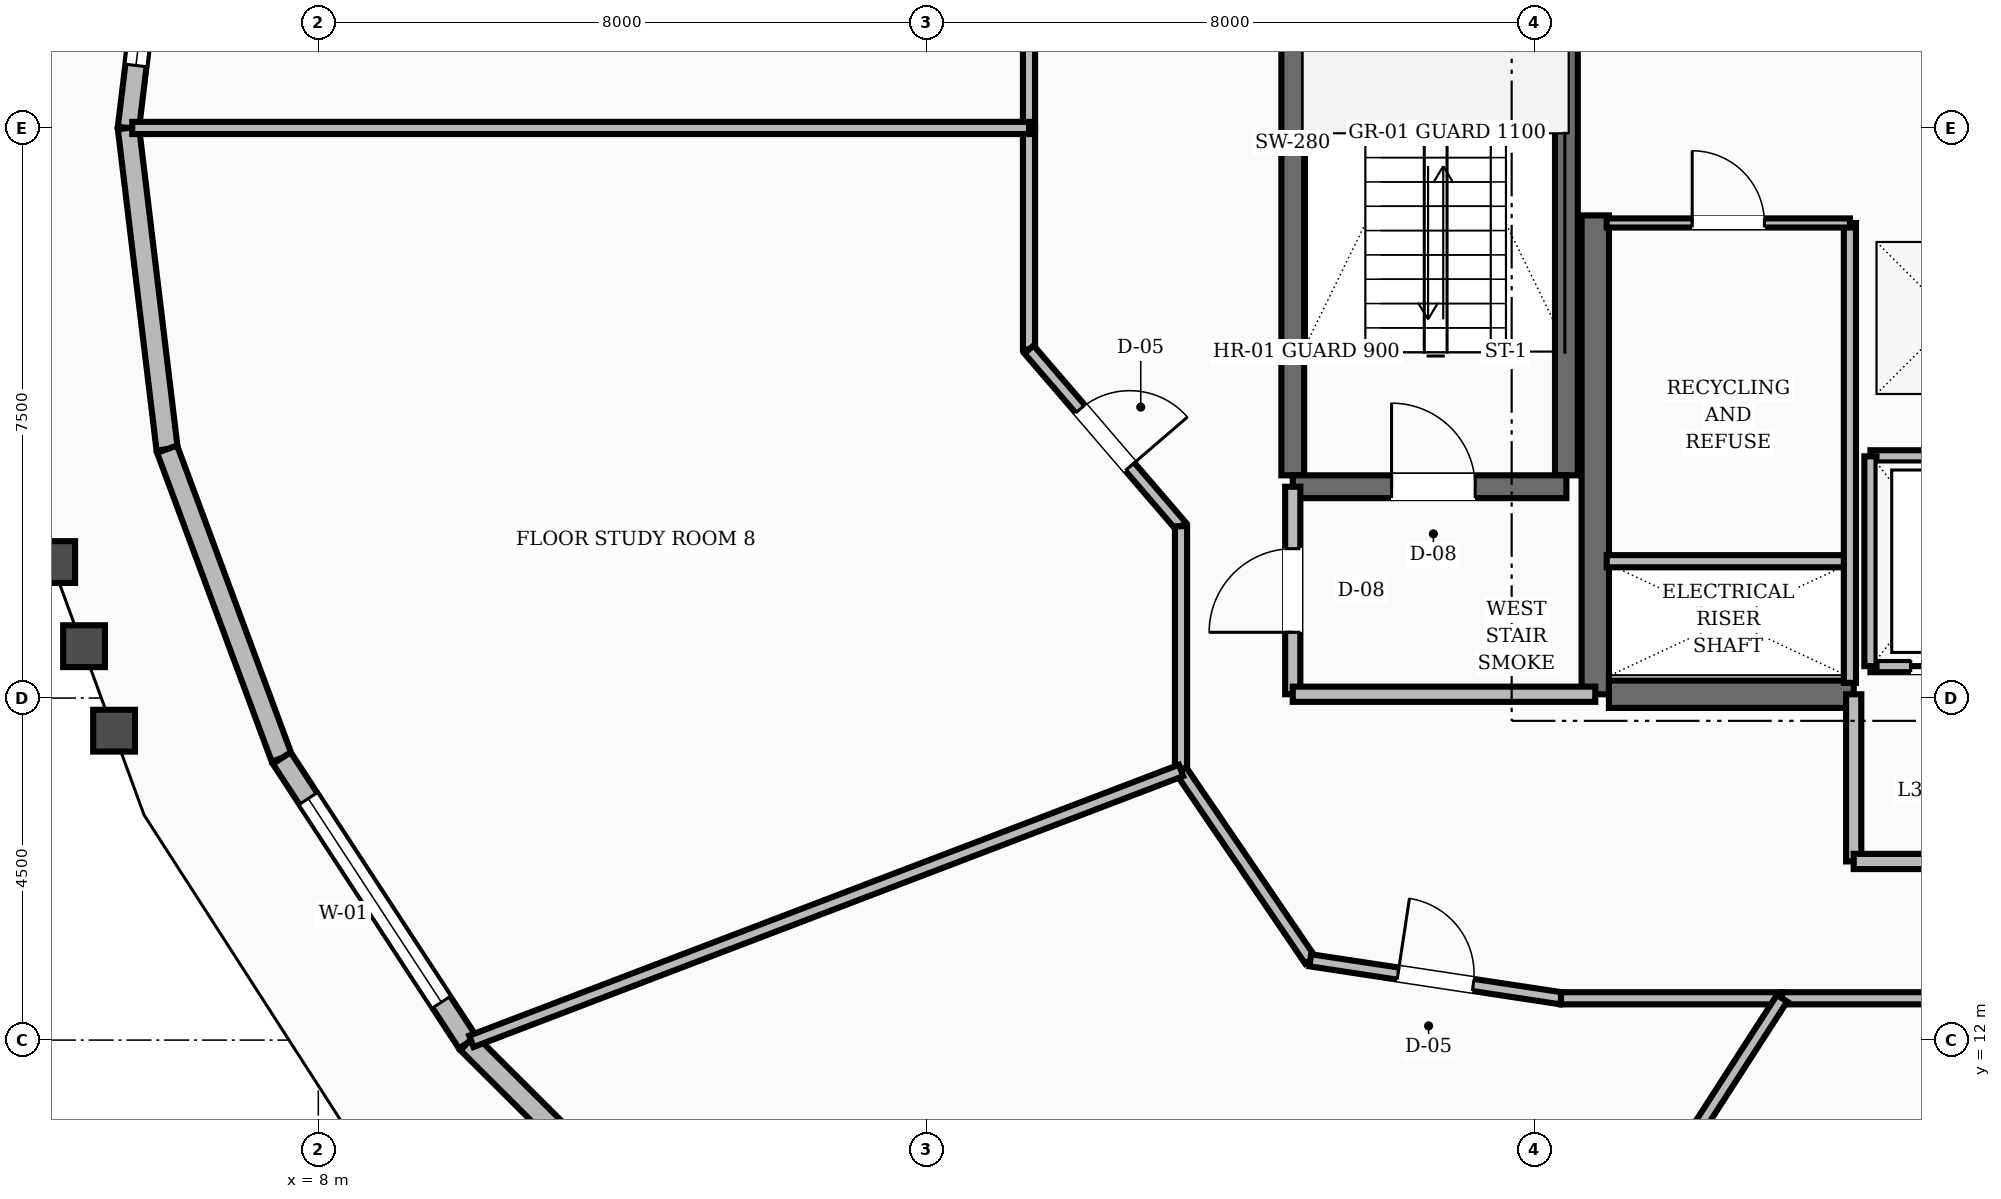
"""IFC4 building model, lengths in metres.
Left out: names, types, materials, properties, quantities, classifications, styles, units other than length and angle.
Written with IfcOpenShell. Run it as: python <this file> out.ifc"""

import sys

from ifc_helpers import new_model, si_unit, direction, frame, frame_2d, origin, place, context, subcontext, project, spatial, rectangle, extrude, element, fill, save


model = new_model("IFC4")
c1 = context("Model", 3, precision=1e-05, world=origin(), true_north=direction((0.0, 1.0)))
c2 = subcontext(c1, "Body", "Model", "MODEL_VIEW")
j1 = project(units=[si_unit("LENGTHUNIT", "METRE"), si_unit("PLANEANGLEUNIT", "RADIAN")], contexts=[c1])
p1 = place(None, origin())
s1 = spatial("IfcSite", under=j1, at=p1, CompositionType="ELEMENT")
p2 = place(p1, origin())
s2 = spatial("IfcBuilding", under=s1, at=p2, CompositionType="ELEMENT")
p3 = place(p2, frame((0.0, 0.0, 138.8)))
s3 = spatial("IfcBuildingStorey", under=s2, at=p3, CompositionType="ELEMENT", Elevation=138.8)
p4 = place(p3, frame((24.8, 16.55, 0.0), z_axis=(0.0, 0.0, 1.0), x_axis=(0.0, 1.0, 0.0)))
e1 = element("IfcWall", 1, at=p4, inside=s3, PredefinedType="SHEAR", context=c2, shape_type="SweptSolid", body=[
    extrude(rectangle(XDim=6.3, YDim=0.36, at=frame_2d((3.15, 0.0))), origin(), (0.0, 0.0, 1.0), 3.6),
])
p5 = place(p3, frame((24.98, 16.55, 0.0), z_axis=(0.0, 0.0, 1.0), x_axis=(1.0, 0.0, 0.0)))
e2 = element("IfcWall", 2, at=p5, inside=s3, PredefinedType="SHEAR", context=c2, shape_type="SweptSolid", body=[
    extrude(rectangle(XDim=3.22, YDim=0.36, at=frame_2d((1.61, 0.0))), origin(), (0.0, 0.0, 1.0), 3.6),
])
for number, where, z_axis, x_axis in (
    (3, (20.82, 19.43, 0.0), (0.0, 0.0, 1.0), (0.0, 1.0, 0.0)),
    (4, (24.42, 19.43, 0.0), (0.0, 0.0, 1.0), (0.0, 1.0, 0.0)),
):
    element("IfcWall", number, at=place(p3, frame(where, z_axis=z_axis, x_axis=x_axis)), inside=s3, PredefinedType="SHEAR", context=c2, shape_type="SweptSolid", body=[
        extrude(rectangle(XDim=8.74, YDim=0.3, at=frame_2d((4.37, 0.0))), origin(), (0.0, 0.0, 1.0), 3.6),
    ])
p6 = place(p3, frame((20.82, 19.28, 0.0), z_axis=(0.0, 0.0, 1.0), x_axis=(1.0, 0.0, 0.0)))
e5 = element("IfcWall", 5, at=p6, inside=s3, PredefinedType="SHEAR", context=c2, shape_type="SweptSolid", body=[
    extrude(rectangle(XDim=3.6, YDim=0.3, at=frame_2d((1.8, 0.0))), origin(), (0.0, 0.0, 1.0), 3.6),
])
p7 = place(p6, frame((1.3, 0.0, 0.0)))
e6 = element("IfcOpeningElement", 6, at=p7, cuts=e5, PredefinedType="OPENING", context=c2, shape_type="SweptSolid", body=[
    extrude(rectangle(XDim=1.1, YDim=2.1, at=frame_2d((0.55, 1.05))), frame((0.0, 0.16, 0.0), z_axis=(0.0, -1.0, 0.0), x_axis=(1.0, 0.0, 0.0)), (0.0, 0.0, 1.0), 0.32),
])
p8 = place(p3, frame((6.011, 28.226, 0.0), z_axis=(0.0, 0.0, 1.0), x_axis=(-0.119649579006, -0.992816185527, 0.0)))
e7 = element("IfcWall", 7, at=p8, inside=s3, PredefinedType="STANDARD", context=c2, shape_type="SweptSolid", body=[
    extrude(rectangle(XDim=4.256, YDim=0.28, at=frame_2d((2.128, 0.0))), origin(), (0.0, 0.0, 1.0), 2.82),
])
p9 = place(p8, frame((0.828, 0.0, 0.8)))
e8 = element("IfcOpeningElement", 8, at=p9, cuts=e7, PredefinedType="OPENING", context=c2, shape_type="SweptSolid", body=[
    extrude(rectangle(XDim=2.6, YDim=1.65, at=frame_2d((1.3, 0.825))), frame((0.0, 0.15, 0.0), z_axis=(0.0, -1.0, 0.0), x_axis=(1.0, 0.0, 0.0)), (0.0, 0.0, 1.0), 0.3),
])
p10 = place(p3, frame((5.502, 24.0, 0.0), z_axis=(0.0, 0.0, 1.0), x_axis=(0.119649579006, -0.992816185527, 0.0)))
e9 = element("IfcWall", 9, at=p10, inside=s3, PredefinedType="STANDARD", context=c2, shape_type="SweptSolid", body=[
    extrude(rectangle(XDim=4.256, YDim=0.28, at=frame_2d((2.128, 0.0))), origin(), (0.0, 0.0, 1.0), 2.82),
])
p11 = place(p3, frame((6.011, 19.774, 0.0), z_axis=(0.0, 0.0, 1.0), x_axis=(0.347886684165, -0.937536588609, 0.0)))
e10 = element("IfcWall", 10, at=p11, inside=s3, PredefinedType="STANDARD", context=c2, shape_type="SweptSolid", body=[
    extrude(rectangle(XDim=4.334, YDim=0.28, at=frame_2d((2.167, 0.0))), origin(), (0.0, 0.0, 1.0), 2.82),
])
p12 = place(p3, frame((7.519, 15.711, 0.0), z_axis=(0.0, 0.0, 1.0), x_axis=(0.54727435463, -0.836953272749, 0.0)))
e11 = element("IfcWall", 11, at=p12, inside=s3, PredefinedType="STANDARD", context=c2, shape_type="SweptSolid", body=[
    extrude(rectangle(XDim=4.474, YDim=0.28, at=frame_2d((2.237, 0.0))), origin(), (0.0, 0.0, 1.0), 2.82),
])
p13 = place(p12, frame((0.637, 0.0, 0.8)))
e12 = element("IfcOpeningElement", 12, at=p13, cuts=e11, PredefinedType="OPENING", context=c2, shape_type="SweptSolid", body=[
    extrude(rectangle(XDim=3.2, YDim=1.65, at=frame_2d((1.6, 0.825))), frame((0.0, 0.15, 0.0), z_axis=(0.0, -1.0, 0.0), x_axis=(1.0, 0.0, 0.0)), (0.0, 0.0, 1.0), 0.3),
])
p14 = place(p3, frame((9.968, 11.966, 0.0), z_axis=(0.0, 0.0, 1.0), x_axis=(0.708522616078, -0.705688105686, 0.0)))
e13 = element("IfcWall", 13, at=p14, inside=s3, PredefinedType="STANDARD", context=c2, shape_type="SweptSolid", body=[
    extrude(rectangle(XDim=4.651, YDim=0.28, at=frame_2d((2.326, 0.0))), origin(), (0.0, 0.0, 1.0), 2.82),
])
p15 = place(p3, frame((20.82, 16.55, 0.0), z_axis=(0.0, 0.0, 1.0), x_axis=(0.0, 1.0, 0.0)))
e14 = element("IfcWall", 14, at=p15, inside=s3, PredefinedType="SOLIDWALL", context=c2, shape_type="SweptSolid", body=[
    extrude(rectangle(XDim=2.73, YDim=0.2, at=frame_2d((1.365, 0.0))), origin(), (0.0, 0.0, 1.0), 2.8),
])
p16 = place(p15, frame((0.815, 0.0, 0.0)))
e15 = element("IfcOpeningElement", 15, at=p16, cuts=e14, PredefinedType="OPENING", context=c2, shape_type="SweptSolid", body=[
    extrude(rectangle(XDim=1.1, YDim=2.1, at=frame_2d((0.55, 1.05))), frame((0.0, 0.11, 0.0), z_axis=(0.0, -1.0, 0.0), x_axis=(1.0, 0.0, 0.0)), (0.0, 0.0, 1.0), 0.22),
])
p17 = place(p3, frame((20.82, 16.55, 0.0), z_axis=(0.0, 0.0, 1.0), x_axis=(1.0, 0.0, 0.0)))
e16 = element("IfcWall", 16, at=p17, inside=s3, PredefinedType="SOLIDWALL", context=c2, shape_type="SweptSolid", body=[
    extrude(rectangle(XDim=3.98, YDim=0.2, at=frame_2d((1.99, 0.0))), origin(), (0.0, 0.0, 1.0), 2.8),
])
p18 = place(p3, frame((28.2, 14.35, 0.0), z_axis=(0.0, 0.0, 1.0), x_axis=(0.0, 1.0, 0.0)))
e17 = element("IfcWall", 17, at=p18, inside=s3, PredefinedType="SOLIDWALL", context=c2, shape_type="SweptSolid", body=[
    extrude(rectangle(XDim=2.2, YDim=0.2, at=frame_2d((1.1, 0.0))), origin(), (0.0, 0.0, 1.0), 2.8),
])
p19 = place(p3, frame((28.2, 14.35, 0.0), z_axis=(0.0, 0.0, 1.0), x_axis=(1.0, 0.0, 0.0)))
e18 = element("IfcWall", 18, at=p19, inside=s3, PredefinedType="SOLIDWALL", context=c2, shape_type="SweptSolid", body=[
    extrude(rectangle(XDim=7.6, YDim=0.2, at=frame_2d((3.8, 0.0))), origin(), (0.0, 0.0, 1.0), 2.8),
])
p20 = place(p19, frame((3.2, 0.0, 0.0)))
e19 = element("IfcOpeningElement", 19, at=p20, cuts=e18, PredefinedType="OPENING", context=c2, shape_type="SweptSolid", body=[
    extrude(rectangle(XDim=1.2, YDim=2.1, at=frame_2d((0.6, 1.05))), frame((0.0, 0.11, 0.0), z_axis=(0.0, -1.0, 0.0), x_axis=(1.0, 0.0, 0.0)), (0.0, 0.0, 1.0), 0.22),
])
p21 = place(p3, frame((28.42, 16.92, 0.0), z_axis=(0.0, 0.0, 1.0), x_axis=(1.0, 0.0, 0.0)))
e20 = element("IfcWall", 20, at=p21, inside=s3, PredefinedType="SOLIDWALL", context=c2, shape_type="SweptSolid", body=[
    extrude(rectangle(XDim=7.16, YDim=0.16, at=frame_2d((3.58, 0.0))), origin(), (0.0, 0.0, 1.0), 2.8),
])
p22 = place(p21, frame((0.53, 0.0, 0.0)))
e21 = element("IfcOpeningElement", 21, at=p22, cuts=e20, PredefinedType="OPENING", context=c2, shape_type="SweptSolid", body=[
    extrude(rectangle(XDim=1.1, YDim=2.15, at=frame_2d((0.55, 1.075))), frame((0.0, 0.09, 0.0), z_axis=(0.0, -1.0, 0.0), x_axis=(1.0, 0.0, 0.0)), (0.0, 0.0, 1.0), 0.18),
])
p23 = place(p21, frame((3.03, 0.0, 0.0)))
e22 = element("IfcOpeningElement", 22, at=p23, cuts=e20, PredefinedType="OPENING", context=c2, shape_type="SweptSolid", body=[
    extrude(rectangle(XDim=1.1, YDim=2.15, at=frame_2d((0.55, 1.075))), frame((0.0, 0.09, 0.0), z_axis=(0.0, -1.0, 0.0), x_axis=(1.0, 0.0, 0.0)), (0.0, 0.0, 1.0), 0.18),
])
p24 = place(p21, frame((5.53, 0.0, 0.0)))
e23 = element("IfcOpeningElement", 23, at=p24, cuts=e20, PredefinedType="OPENING", context=c2, shape_type="SweptSolid", body=[
    extrude(rectangle(XDim=1.1, YDim=2.15, at=frame_2d((0.55, 1.075))), frame((0.0, 0.09, 0.0), z_axis=(0.0, -1.0, 0.0), x_axis=(1.0, 0.0, 0.0)), (0.0, 0.0, 1.0), 0.18),
])
p25 = place(p3, frame((28.42, 19.68, 0.0), z_axis=(0.0, 0.0, 1.0), x_axis=(1.0, 0.0, 0.0)))
e24 = element("IfcWall", 24, at=p25, inside=s3, PredefinedType="SOLIDWALL", context=c2, shape_type="SweptSolid", body=[
    extrude(rectangle(XDim=7.16, YDim=0.16, at=frame_2d((3.58, 0.0))), origin(), (0.0, 0.0, 1.0), 2.8),
])
p26 = place(p3, frame((28.42, 16.92, 0.0), z_axis=(0.0, 0.0, 1.0), x_axis=(0.0, 1.0, 0.0)))
e25 = element("IfcWall", 25, at=p26, inside=s3, PredefinedType="SOLIDWALL", context=c2, shape_type="SweptSolid", body=[
    extrude(rectangle(XDim=2.76, YDim=0.16, at=frame_2d((1.38, 0.0))), origin(), (0.0, 0.0, 1.0), 2.8),
])
p27 = place(p3, frame((24.95, 18.3, 0.0), z_axis=(0.0, 0.0, 1.0), x_axis=(1.0, 0.0, 0.0)))
e26 = element("IfcWall", 26, at=p27, inside=s3, PredefinedType="SOLIDWALL", context=c2, shape_type="SweptSolid", body=[
    extrude(rectangle(XDim=3.2, YDim=0.16, at=frame_2d((1.6, 0.0))), origin(), (0.0, 0.0, 1.0), 2.8),
])
p28 = place(p3, frame((28.15, 16.7, 0.0), z_axis=(0.0, 0.0, 1.0), x_axis=(0.0, 1.0, 0.0)))
e27 = element("IfcWall", 27, at=p28, inside=s3, PredefinedType="SOLIDWALL", context=c2, shape_type="SweptSolid", body=[
    extrude(rectangle(XDim=6.05, YDim=0.16, at=frame_2d((3.025, 0.0))), origin(), (0.0, 0.0, 1.0), 2.8),
])
p29 = place(p3, frame((24.95, 22.75, 0.0), z_axis=(0.0, 0.0, 1.0), x_axis=(1.0, 0.0, 0.0)))
e28 = element("IfcWall", 28, at=p29, inside=s3, PredefinedType="PARTITIONING", context=c2, shape_type="SweptSolid", body=[
    extrude(rectangle(XDim=3.2, YDim=0.12, at=frame_2d((1.6, 0.0))), origin(), (0.0, 0.0, 1.0), 2.8),
])
p30 = place(p29, frame((1.125, 0.0, 0.0)))
e29 = element("IfcOpeningElement", 29, at=p30, cuts=e28, PredefinedType="OPENING", context=c2, shape_type="SweptSolid", body=[
    extrude(rectangle(XDim=0.95, YDim=2.1, at=frame_2d((0.475, 1.05))), frame((0.0, 0.07, 0.0), z_axis=(0.0, -1.0, 0.0), x_axis=(1.0, 0.0, 0.0)), (0.0, 0.0, 1.0), 0.14),
])
for number, where, z_axis, x_axis in (
    (30, (17.35, 26.914, 0.0), (0.0, 0.0, 1.0), (0.0, -1.0, 0.0)),
    (31, (17.35, 24.0, 0.0), (0.0, 0.0, 1.0), (0.0, -1.0, 0.0)),
):
    element("IfcWall", number, at=place(p3, frame(where, z_axis=z_axis, x_axis=x_axis)), inside=s3, PredefinedType="SOLIDWALL", context=c2, shape_type="SweptSolid", body=[
        extrude(rectangle(XDim=2.914, YDim=0.16, at=frame_2d((1.457, 0.0))), origin(), (0.0, 0.0, 1.0), 2.8),
    ])
p31 = place(p3, frame((17.35, 21.086, 0.0), z_axis=(0.0, 0.0, 1.0), x_axis=(0.652022797448, -0.758199361388, 0.0)))
e32 = element("IfcWall", 32, at=p31, inside=s3, PredefinedType="SOLIDWALL", context=c2, shape_type="SweptSolid", body=[
    extrude(rectangle(XDim=3.067, YDim=0.16, at=frame_2d((1.534, 0.0))), origin(), (0.0, 0.0, 1.0), 2.8),
])
p32 = place(p31, frame((1.034, 0.0, 0.0)))
e33 = element("IfcOpeningElement", 33, at=p32, cuts=e32, PredefinedType="OPENING", context=c2, shape_type="SweptSolid", body=[
    extrude(rectangle(XDim=1.0, YDim=2.1, at=frame_2d((0.5, 1.05))), frame((0.0, 0.09, 0.0), z_axis=(0.0, -1.0, 0.0), x_axis=(1.0, 0.0, 0.0)), (0.0, 0.0, 1.0), 0.18),
])
p33 = place(p3, frame((19.35, 18.76, 0.0), z_axis=(0.0, 0.0, 1.0), x_axis=(0.0, -1.0, 0.0)))
e34 = element("IfcWall", 34, at=p33, inside=s3, PredefinedType="SOLIDWALL", context=c2, shape_type="SweptSolid", body=[
    extrude(rectangle(XDim=3.213, YDim=0.16, at=frame_2d((1.606, 0.0))), origin(), (0.0, 0.0, 1.0), 2.8),
])
p34 = place(p3, frame((19.35, 15.548, 0.0), z_axis=(0.0, 0.0, 1.0), x_axis=(0.562674669208, -0.826678423955, 0.0)))
e35 = element("IfcWall", 35, at=p34, inside=s3, PredefinedType="SOLIDWALL", context=c2, shape_type="SweptSolid", body=[
    extrude(rectangle(XDim=3.021, YDim=0.16, at=frame_2d((1.511, 0.0))), origin(), (0.0, 0.0, 1.0), 2.8),
])
p35 = place(p3, frame((21.05, 13.05, 0.0), z_axis=(0.0, 0.0, 1.0), x_axis=(0.988710906508, -0.149835721217, 0.0)))
e36 = element("IfcWall", 36, at=p35, inside=s3, PredefinedType="SOLIDWALL", context=c2, shape_type="SweptSolid", body=[
    extrude(rectangle(XDim=3.337, YDim=0.16, at=frame_2d((1.668, 0.0))), origin(), (0.0, 0.0, 1.0), 2.8),
])
p36 = place(p35, frame((1.168, 0.0, 0.0)))
e37 = element("IfcOpeningElement", 37, at=p36, cuts=e36, PredefinedType="OPENING", context=c2, shape_type="SweptSolid", body=[
    extrude(rectangle(XDim=1.0, YDim=2.1, at=frame_2d((0.5, 1.05))), frame((0.0, 0.09, 0.0), z_axis=(0.0, -1.0, 0.0), x_axis=(1.0, 0.0, 0.0)), (0.0, 0.0, 1.0), 0.18),
])
p37 = place(p3, frame((24.349, 12.55, 0.0), z_axis=(0.0, 0.0, 1.0), x_axis=(1.0, 0.0, 0.0)))
e38 = element("IfcWall", 38, at=p37, inside=s3, PredefinedType="SOLIDWALL", context=c2, shape_type="SweptSolid", body=[
    extrude(rectangle(XDim=2.908, YDim=0.16, at=frame_2d((1.454, 0.0))), origin(), (0.0, 0.0, 1.0), 2.8),
])
p38 = place(p3, frame((27.257, 12.55, 0.0), z_axis=(0.0, 0.0, 1.0), x_axis=(1.0, 0.0, 0.0)))
e39 = element("IfcWall", 39, at=p38, inside=s3, PredefinedType="SOLIDWALL", context=c2, shape_type="SweptSolid", body=[
    extrude(rectangle(XDim=2.465, YDim=0.16, at=frame_2d((1.232, 0.0))), origin(), (0.0, 0.0, 1.0), 2.8),
])
p39 = place(p3, frame((17.35, 24.0, 0.0), z_axis=(0.0, 0.0, 1.0), x_axis=(-1.0, 0.0, 0.0)))
e40 = element("IfcWall", 40, at=p39, inside=s3, PredefinedType="SOLIDWALL", context=c2, shape_type="SweptSolid", body=[
    extrude(rectangle(XDim=11.798, YDim=0.16, at=frame_2d((5.899, 0.0))), origin(), (0.0, 0.0, 1.0), 2.8),
])
p40 = place(p3, frame((19.35, 15.548, 0.0), z_axis=(0.0, 0.0, 1.0), x_axis=(-0.934240587941, -0.356643412729, 0.0)))
e41 = element("IfcWall", 41, at=p40, inside=s3, PredefinedType="SOLIDWALL", context=c2, shape_type="SweptSolid", body=[
    extrude(rectangle(XDim=9.993, YDim=0.16, at=frame_2d((4.997, 0.0))), origin(), (0.0, 0.0, 1.0), 2.8),
])
p41 = place(p3, frame((27.257, 12.55, 0.0), z_axis=(0.0, 0.0, 1.0), x_axis=(-0.541642544566, -0.840608918532, 0.0)))
e42 = element("IfcWall", 42, at=p41, inside=s3, PredefinedType="SOLIDWALL", context=c2, shape_type="SweptSolid", body=[
    extrude(rectangle(XDim=9.52, YDim=0.16, at=frame_2d((4.76, 0.0))), origin(), (0.0, 0.0, 1.0), 2.8),
])
p42 = place(p9, origin())
e43 = element("IfcWindow", 43, at=p42, inside=s3, PartitioningType="SINGLE_PANEL", PredefinedType="WINDOW", context=c2, shape_type="SweptSolid", body=[
    extrude(rectangle(XDim=2.6, YDim=1.65, at=frame_2d((1.3, 0.825))), frame((0.0, 0.03, 0.0), z_axis=(0.0, -1.0, 0.0), x_axis=(1.0, 0.0, 0.0)), (0.0, 0.0, 1.0), 0.06),
])
fill(e8, e43)
p43 = place(p13, origin())
e44 = element("IfcWindow", 44, at=p43, inside=s3, PartitioningType="SINGLE_PANEL", PredefinedType="WINDOW", context=c2, shape_type="SweptSolid", body=[
    extrude(rectangle(XDim=3.2, YDim=1.65, at=frame_2d((1.6, 0.825))), frame((0.0, 0.03, 0.0), z_axis=(0.0, -1.0, 0.0), x_axis=(1.0, 0.0, 0.0)), (0.0, 0.0, 1.0), 0.06),
])
fill(e12, e44)
p44 = place(p7, origin())
e45 = element("IfcDoor", 45, at=p44, inside=s3, OperationType="SINGLE_SWING_LEFT", PredefinedType="DOOR", context=c2, shape_type="SweptSolid", body=[
    extrude(rectangle(XDim=1.1, YDim=2.1, at=frame_2d((0.55, 1.05))), frame((0.0, 0.025, 0.0), z_axis=(0.0, -1.0, 0.0), x_axis=(1.0, 0.0, 0.0)), (0.0, 0.0, 1.0), 0.05),
])
fill(e6, e45)
p45 = place(p16, origin())
e46 = element("IfcDoor", 46, at=p45, inside=s3, OperationType="SINGLE_SWING_LEFT", PredefinedType="DOOR", context=c2, shape_type="SweptSolid", body=[
    extrude(rectangle(XDim=1.1, YDim=2.1, at=frame_2d((0.55, 1.05))), frame((0.0, 0.025, 0.0), z_axis=(0.0, -1.0, 0.0), x_axis=(1.0, 0.0, 0.0)), (0.0, 0.0, 1.0), 0.05),
])
fill(e15, e46)
p46 = place(p22, origin())
e47 = element("IfcDoor", 47, at=p46, inside=s3, OperationType="SLIDING_TO_RIGHT", PredefinedType="DOOR", context=c2, shape_type="SweptSolid", body=[
    extrude(rectangle(XDim=1.1, YDim=2.15, at=frame_2d((0.55, 1.075))), frame((0.0, 0.025, 0.0), z_axis=(0.0, -1.0, 0.0), x_axis=(1.0, 0.0, 0.0)), (0.0, 0.0, 1.0), 0.05),
])
fill(e21, e47)
p47 = place(p30, origin())
e48 = element("IfcDoor", 48, at=p47, inside=s3, OperationType="SINGLE_SWING_LEFT", PredefinedType="DOOR", context=c2, shape_type="SweptSolid", body=[
    extrude(rectangle(XDim=0.95, YDim=2.1, at=frame_2d((0.475, 1.05))), frame((0.0, 0.025, 0.0), z_axis=(0.0, -1.0, 0.0), x_axis=(1.0, 0.0, 0.0)), (0.0, 0.0, 1.0), 0.05),
])
fill(e29, e48)
p48 = place(p32, origin())
e49 = element("IfcDoor", 49, at=p48, inside=s3, OperationType="SINGLE_SWING_RIGHT", PredefinedType="DOOR", context=c2, shape_type="SweptSolid", body=[
    extrude(rectangle(XDim=1.0, YDim=2.1, at=frame_2d((0.5, 1.05))), frame((0.0, 0.025, 0.0), z_axis=(0.0, -1.0, 0.0), x_axis=(1.0, 0.0, 0.0)), (0.0, 0.0, 1.0), 0.05),
])
fill(e33, e49)
p49 = place(p36, origin())
e50 = element("IfcDoor", 50, at=p49, inside=s3, OperationType="SINGLE_SWING_LEFT", PredefinedType="DOOR", context=c2, shape_type="SweptSolid", body=[
    extrude(rectangle(XDim=1.0, YDim=2.1, at=frame_2d((0.5, 1.05))), frame((0.0, 0.025, 0.0), z_axis=(0.0, -1.0, 0.0), x_axis=(1.0, 0.0, 0.0)), (0.0, 0.0, 1.0), 0.05),
])
fill(e37, e50)
save(model, sys.argv[1])
